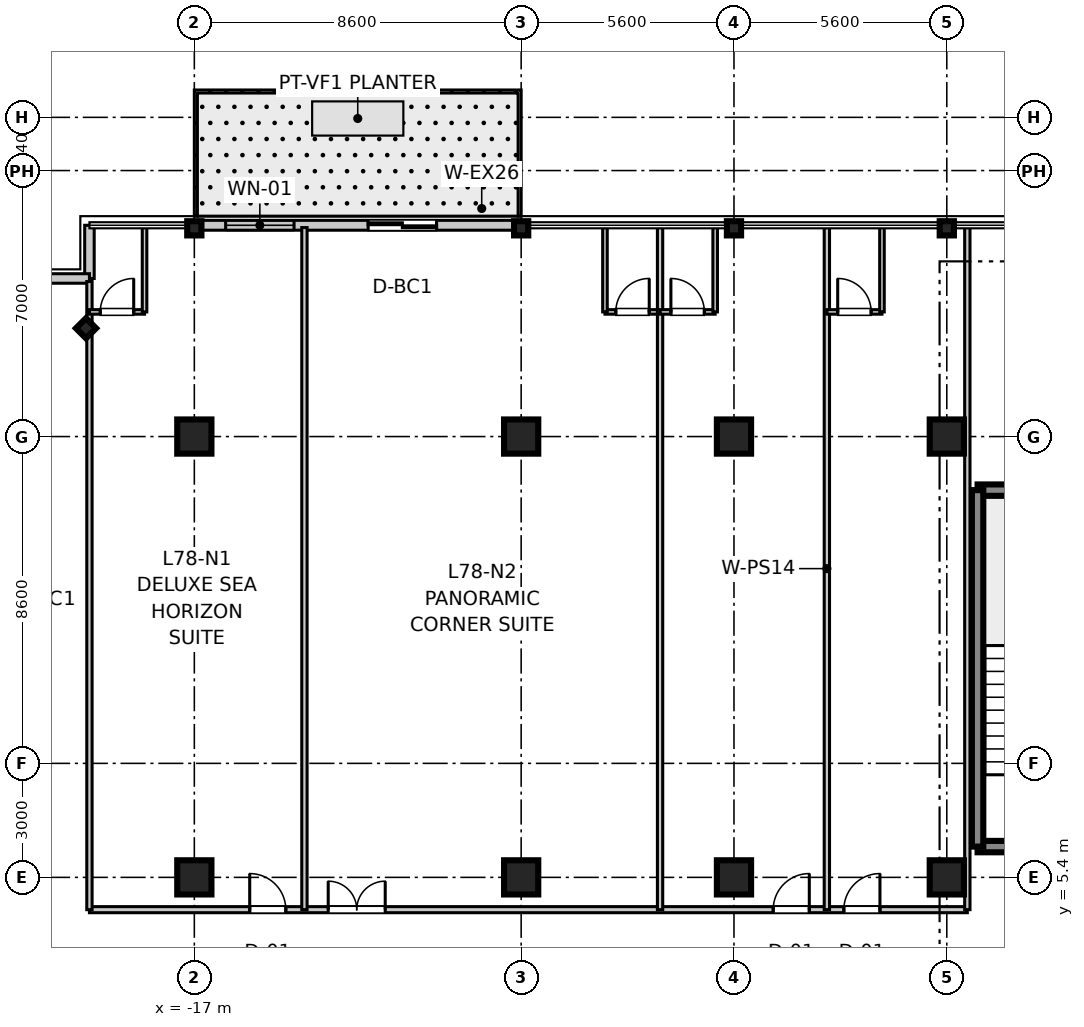
"""IFC4 building model, lengths in metres.
Left out: names, types, materials, properties, quantities, classifications, styles, units other than length and angle.
Written with IfcOpenShell. Run it as: python <this file> out.ifc"""

import sys

from ifc_helpers import new_model, si_unit, direction, frame, frame_2d, origin, origin_2d, place, context, subcontext, project, spatial, rectangle, i_section, extrude, source, transform, mapped, element, fill, save


model = new_model("IFC4")
c1 = context("Model", 3, precision=1e-05, world=origin(), true_north=direction((0.0, 1.0)))
c2 = subcontext(c1, "Body", "Model", "MODEL_VIEW")
j1 = project(units=[si_unit("LENGTHUNIT", "METRE"), si_unit("PLANEANGLEUNIT", "RADIAN")], contexts=[c1])
p1 = place(None, origin())
s1 = spatial("IfcSite", under=j1, at=p1, CompositionType="ELEMENT")
p2 = place(p1, origin())
s2 = spatial("IfcBuilding", under=s1, at=p2, CompositionType="ELEMENT")
p3 = place(p2, frame((0.0, 0.0, 304.2)))
s3 = spatial("IfcBuildingStorey", under=s2, at=p3, CompositionType="ELEMENT", Elevation=304.2)
m1 = source(origin(), c2, "Body", "SweptSolid", [
    extrude(rectangle(XDim=0.9, YDim=0.9, at=origin_2d()), origin(), (0.0, 0.0, 1.0), 3.805),
])
for number, where, z_axis, x_axis in (
    (1, (-17.0, 5.4, 0.0), (0.0, 0.0, 1.0), (1.0, 0.0, 0.0)),
    (2, (-17.0, 17.0, 0.0), (0.0, 0.0, 1.0), (1.0, 0.0, 0.0)),
    (3, (-8.4, 5.4, 0.0), (0.0, 0.0, 1.0), (1.0, 0.0, 0.0)),
    (4, (-8.4, 17.0, 0.0), (0.0, 0.0, 1.0), (1.0, 0.0, 0.0)),
    (5, (-2.8, 5.4, 0.0), (0.0, 0.0, 1.0), (1.0, 0.0, 0.0)),
    (6, (-2.8, 17.0, 0.0), (0.0, 0.0, 1.0), (1.0, 0.0, 0.0)),
    (7, (2.8, 5.4, 0.0), (0.0, 0.0, 1.0), (1.0, 0.0, 0.0)),
    (8, (2.8, 17.0, 0.0), (0.0, 0.0, 1.0), (1.0, 0.0, 0.0)),
):
    element("IfcColumn", number, at=place(p3, frame(where, z_axis=z_axis, x_axis=x_axis)), inside=s3, PredefinedType="COLUMN", context=c2, shape_type="MappedRepresentation", body=[
        mapped(m1, transform((0.0, 0.0, 0.0), scale=1.0)),
    ])
m2 = source(origin(), c2, "Body", "SweptSolid", [
    extrude(i_section(OverallWidth=0.374, OverallDepth=0.374, WebThickness=0.014, FlangeThickness=0.023, at=origin_2d()), origin(), (0.0, 0.0, 1.0), 3.805),
])
for number, where, z_axis, x_axis in (
    (9, (-17.0, 22.48, 0.0), (0.0, 0.0, 1.0), (0.0, 1.0, 0.0)),
    (10, (-8.4, 22.48, 0.0), (0.0, 0.0, 1.0), (0.0, 1.0, 0.0)),
    (11, (-2.8, 22.48, 0.0), (0.0, 0.0, 1.0), (0.0, 1.0, 0.0)),
    (12, (2.8, 22.48, 0.0), (0.0, 0.0, 1.0), (0.0, 1.0, 0.0)),
    (13, (-19.85, 19.85, 0.0), (0.0, 0.0, 1.0), (0.707, 0.707, 0.0)),
):
    element("IfcColumn", number, at=place(p3, frame(where, z_axis=z_axis, x_axis=x_axis)), inside=s3, PredefinedType="COLUMN", context=c2, shape_type="MappedRepresentation", body=[
        mapped(m2, transform((0.0, 0.0, 0.0), scale=1.0)),
    ])
m3 = source(origin(), c2, "Body", "SweptSolid", [
    extrude(rectangle(XDim=3.98, YDim=0.3, at=frame_2d((1.99, 0.0))), origin(), (0.0, 0.0, 1.0), 3.55),
])
for number, where, z_axis, x_axis in (
    (14, (3.61, 6.21, 0.0), (0.0, 0.0, 1.0), (1.0, 0.0, 0.0)),
    (15, (3.61, 15.59, 0.0), (0.0, 0.0, 1.0), (1.0, 0.0, 0.0)),
):
    element("IfcWall", number, at=place(p3, frame(where, z_axis=z_axis, x_axis=x_axis)), inside=s3, PredefinedType="SHEAR", context=c2, shape_type="MappedRepresentation", body=[
        mapped(m3, transform((0.0, 0.0, 0.0), scale=1.0)),
    ])
m4 = source(origin(), c2, "Body", "SweptSolid", [
    extrude(rectangle(XDim=9.38, YDim=0.3, at=frame_2d((4.69, 0.0))), origin(), (0.0, 0.0, 1.0), 3.55),
])
p4 = place(p3, frame((3.61, 6.21, 0.0), z_axis=(0.0, 0.0, 1.0), x_axis=(0.0, 1.0, 0.0)))
e16 = element("IfcWall", 16, at=p4, inside=s3, PredefinedType="SHEAR", context=c2, shape_type="MappedRepresentation", body=[
    mapped(m4, transform((0.0, 0.0, 0.0), scale=1.0)),
])
m5 = source(origin(), c2, "Body", "SweptSolid", [
    extrude(rectangle(XDim=1.4, YDim=0.25, at=frame_2d((0.7, 0.0))), origin(), (0.0, 0.0, 1.0), 3.55),
])
p5 = place(p3, frame((-19.76, 21.16, 0.0), z_axis=(0.0, 0.0, 1.0), x_axis=(0.0, 1.0, 0.0)))
e17 = element("IfcWall", 17, at=p5, inside=s3, PredefinedType="STANDARD", context=c2, shape_type="MappedRepresentation", body=[
    mapped(m5, transform((0.0, 0.0, 0.0), scale=1.0)),
])
m6 = source(origin(), c2, "Body", "SweptSolid", [
    extrude(rectangle(XDim=1.4, YDim=0.25, at=frame_2d((0.7, 0.0))), origin(), (0.0, 0.0, 1.0), 3.55),
])
p6 = place(p3, frame((-21.16, 21.16, 0.0), z_axis=(0.0, 0.0, 1.0), x_axis=(1.0, 0.0, 0.0)))
e18 = element("IfcWall", 18, at=p6, inside=s3, PredefinedType="STANDARD", context=c2, shape_type="MappedRepresentation", body=[
    mapped(m6, transform((0.0, 0.0, 0.0), scale=1.0)),
])
m7 = source(origin(), c2, "Body", "SweptSolid", [
    extrude(rectangle(XDim=8.6, YDim=0.26, at=frame_2d((4.3, 0.0))), origin(), (0.0, 0.0, 1.0), 3.03),
])
p7 = place(p3, frame((-17.0, 22.56, 0.0), z_axis=(0.0, 0.0, 1.0), x_axis=(1.0, 0.0, 0.0)))
e19 = element("IfcWall", 19, at=p7, inside=s3, PredefinedType="STANDARD", context=c2, shape_type="MappedRepresentation", body=[
    mapped(m7, transform((0.0, 0.0, 0.0), scale=1.0)),
])
p8 = place(p7, frame((4.574, 0.0, 0.0)))
e20 = element("IfcOpeningElement", 20, at=p8, cuts=e19, PredefinedType="OPENING", context=c2, shape_type="SweptSolid", body=[
    extrude(rectangle(XDim=1.8, YDim=2.25, at=frame_2d((0.9, 1.125))), frame((0.0, 0.14, 0.0), z_axis=(0.0, -1.0, 0.0), x_axis=(1.0, 0.0, 0.0)), (0.0, 0.0, 1.0), 0.28),
])
p9 = place(p7, frame((0.824, 0.0, 0.85)))
e21 = element("IfcOpeningElement", 21, at=p9, cuts=e19, PredefinedType="OPENING", context=c2, shape_type="SweptSolid", body=[
    extrude(rectangle(XDim=1.8, YDim=1.5, at=frame_2d((0.9, 0.75))), frame((0.0, 0.14, 0.0), z_axis=(0.0, -1.0, 0.0), x_axis=(1.0, 0.0, 0.0)), (0.0, 0.0, 1.0), 0.28),
])
m8 = source(origin(), c2, "Body", "SweptSolid", [
    extrude(rectangle(XDim=23.1, YDim=0.16, at=frame_2d((11.55, 0.0))), origin(), (0.0, 0.0, 1.0), 2.89),
])
p10 = place(p3, frame((-19.76, 4.55, 0.0), z_axis=(0.0, 0.0, 1.0), x_axis=(1.0, 0.0, 0.0)))
e22 = element("IfcWall", 22, at=p10, inside=s3, PredefinedType="PARTITIONING", context=c2, shape_type="MappedRepresentation", body=[
    mapped(m8, transform((0.0, 0.0, 0.0), scale=1.0)),
])
p11 = place(p10, frame((4.217, 0.0, 0.0)))
e23 = element("IfcOpeningElement", 23, at=p11, cuts=e22, PredefinedType="OPENING", context=c2, shape_type="SweptSolid", body=[
    extrude(rectangle(XDim=0.95, YDim=2.1, at=frame_2d((0.475, 1.05))), frame((0.0, 0.09, 0.0), z_axis=(0.0, -1.0, 0.0), x_axis=(1.0, 0.0, 0.0)), (0.0, 0.0, 1.0), 0.18),
])
p12 = place(p10, frame((6.283, 0.0, 0.0)))
e24 = element("IfcOpeningElement", 24, at=p12, cuts=e22, PredefinedType="OPENING", context=c2, shape_type="SweptSolid", body=[
    extrude(rectangle(XDim=1.5, YDim=2.15, at=frame_2d((0.75, 1.075))), frame((0.0, 0.09, 0.0), z_axis=(0.0, -1.0, 0.0), x_axis=(1.0, 0.0, 0.0)), (0.0, 0.0, 1.0), 0.18),
])
p13 = place(p10, frame((17.992, 0.0, 0.0)))
e25 = element("IfcOpeningElement", 25, at=p13, cuts=e22, PredefinedType="OPENING", context=c2, shape_type="SweptSolid", body=[
    extrude(rectangle(XDim=0.95, YDim=2.1, at=frame_2d((0.475, 1.05))), frame((0.0, 0.09, 0.0), z_axis=(0.0, -1.0, 0.0), x_axis=(1.0, 0.0, 0.0)), (0.0, 0.0, 1.0), 0.18),
])
p14 = place(p10, frame((19.851, 0.0, 0.0)))
e26 = element("IfcOpeningElement", 26, at=p14, cuts=e22, PredefinedType="OPENING", context=c2, shape_type="SweptSolid", body=[
    extrude(rectangle(XDim=0.95, YDim=2.1, at=frame_2d((0.475, 1.05))), frame((0.0, 0.09, 0.0), z_axis=(0.0, -1.0, 0.0), x_axis=(1.0, 0.0, 0.0)), (0.0, 0.0, 1.0), 0.18),
])
m9 = source(origin(), c2, "Body", "SweptSolid", [
    extrude(rectangle(XDim=16.53, YDim=0.14, at=frame_2d((8.265, 0.0))), origin(), (0.0, 0.0, 1.0), 2.89),
])
p15 = place(p3, frame((-19.76, 4.55, 0.0), z_axis=(0.0, 0.0, 1.0), x_axis=(0.0, 1.0, 0.0)))
e27 = element("IfcWall", 27, at=p15, inside=s3, PredefinedType="PARTITIONING", context=c2, shape_type="MappedRepresentation", body=[
    mapped(m9, transform((0.0, 0.0, 0.0), scale=1.0)),
])
m10 = source(origin(), c2, "Body", "SweptSolid", [
    extrude(rectangle(XDim=17.95, YDim=0.14, at=frame_2d((8.975, 0.0))), origin(), (0.0, 0.0, 1.0), 2.89),
])
p16 = place(p3, frame((3.34, 4.55, 0.0), z_axis=(0.0, 0.0, 1.0), x_axis=(0.0, 1.0, 0.0)))
e28 = element("IfcWall", 28, at=p16, inside=s3, PredefinedType="PARTITIONING", context=c2, shape_type="MappedRepresentation", body=[
    mapped(m10, transform((0.0, 0.0, 0.0), scale=1.0)),
])
m11 = source(origin(), c2, "Body", "SweptSolid", [
    extrude(rectangle(XDim=1.45, YDim=0.12, at=frame_2d((0.725, 0.0))), origin(), (0.0, 0.0, 1.0), 2.89),
])
p17 = place(p3, frame((-19.76, 20.28, 0.0), z_axis=(0.0, 0.0, 1.0), x_axis=(1.0, 0.0, 0.0)))
e29 = element("IfcWall", 29, at=p17, inside=s3, PredefinedType="PARTITIONING", context=c2, shape_type="MappedRepresentation", body=[
    mapped(m11, transform((0.0, 0.0, 0.0), scale=1.0)),
])
p18 = place(p17, frame((0.285, 0.0, 0.0)))
e30 = element("IfcOpeningElement", 30, at=p18, cuts=e29, PredefinedType="OPENING", context=c2, shape_type="SweptSolid", body=[
    extrude(rectangle(XDim=0.88, YDim=2.1, at=frame_2d((0.44, 1.05))), frame((0.0, 0.07, 0.0), z_axis=(0.0, -1.0, 0.0), x_axis=(1.0, 0.0, 0.0)), (0.0, 0.0, 1.0), 0.14),
])
m12 = source(origin(), c2, "Body", "SweptSolid", [
    extrude(rectangle(XDim=2.22, YDim=0.12, at=frame_2d((1.11, 0.0))), origin(), (0.0, 0.0, 1.0), 2.89),
])
p19 = place(p3, frame((-18.31, 20.28, 0.0), z_axis=(0.0, 0.0, 1.0), x_axis=(0.0, 1.0, 0.0)))
e31 = element("IfcWall", 31, at=p19, inside=s3, PredefinedType="PARTITIONING", context=c2, shape_type="MappedRepresentation", body=[
    mapped(m12, transform((0.0, 0.0, 0.0), scale=1.0)),
])
p20 = place(p3, frame((-14.103, 4.55, 0.0), z_axis=(0.0, 0.0, 1.0), x_axis=(0.0, 1.0, 0.0)))
e32 = element("IfcWall", 32, at=p20, inside=s3, PredefinedType="PARTITIONING", context=c2, shape_type="MappedRepresentation", body=[
    mapped(m10, transform((0.0, 0.0, 0.0), scale=1.0)),
])
p21 = place(p3, frame((-6.195, 20.28, 0.0), z_axis=(0.0, 0.0, 1.0), x_axis=(1.0, 0.0, 0.0)))
e33 = element("IfcWall", 33, at=p21, inside=s3, PredefinedType="PARTITIONING", context=c2, shape_type="MappedRepresentation", body=[
    mapped(m11, transform((0.0, 0.0, 0.0), scale=1.0)),
])
p22 = place(p21, frame((0.285, 0.0, 0.0)))
e34 = element("IfcOpeningElement", 34, at=p22, cuts=e33, PredefinedType="OPENING", context=c2, shape_type="SweptSolid", body=[
    extrude(rectangle(XDim=0.88, YDim=2.1, at=frame_2d((0.44, 1.05))), frame((0.0, 0.07, 0.0), z_axis=(0.0, -1.0, 0.0), x_axis=(1.0, 0.0, 0.0)), (0.0, 0.0, 1.0), 0.14),
])
p23 = place(p3, frame((-6.195, 20.28, 0.0), z_axis=(0.0, 0.0, 1.0), x_axis=(0.0, 1.0, 0.0)))
e35 = element("IfcWall", 35, at=p23, inside=s3, PredefinedType="PARTITIONING", context=c2, shape_type="MappedRepresentation", body=[
    mapped(m12, transform((0.0, 0.0, 0.0), scale=1.0)),
])
p24 = place(p3, frame((-4.745, 4.55, 0.0), z_axis=(0.0, 0.0, 1.0), x_axis=(0.0, 1.0, 0.0)))
e36 = element("IfcWall", 36, at=p24, inside=s3, PredefinedType="PARTITIONING", context=c2, shape_type="MappedRepresentation", body=[
    mapped(m10, transform((0.0, 0.0, 0.0), scale=1.0)),
])
m13 = source(origin(), c2, "Body", "SweptSolid", [
    extrude(rectangle(XDim=1.45, YDim=0.12, at=frame_2d((0.725, 0.0))), origin(), (0.0, 0.0, 1.0), 2.89),
])
p25 = place(p3, frame((-4.745, 20.28, 0.0), z_axis=(0.0, 0.0, 1.0), x_axis=(1.0, 0.0, 0.0)))
e37 = element("IfcWall", 37, at=p25, inside=s3, PredefinedType="PARTITIONING", context=c2, shape_type="MappedRepresentation", body=[
    mapped(m13, transform((0.0, 0.0, 0.0), scale=1.0)),
])
p26 = place(p25, frame((0.285, 0.0, 0.0)))
e38 = element("IfcOpeningElement", 38, at=p26, cuts=e37, PredefinedType="OPENING", context=c2, shape_type="SweptSolid", body=[
    extrude(rectangle(XDim=0.88, YDim=2.1, at=frame_2d((0.44, 1.05))), frame((0.0, 0.07, 0.0), z_axis=(0.0, -1.0, 0.0), x_axis=(1.0, 0.0, 0.0)), (0.0, 0.0, 1.0), 0.14),
])
p27 = place(p3, frame((-3.295, 20.28, 0.0), z_axis=(0.0, 0.0, 1.0), x_axis=(0.0, 1.0, 0.0)))
e39 = element("IfcWall", 39, at=p27, inside=s3, PredefinedType="PARTITIONING", context=c2, shape_type="MappedRepresentation", body=[
    mapped(m12, transform((0.0, 0.0, 0.0), scale=1.0)),
])
p28 = place(p3, frame((-0.356, 4.55, 0.0), z_axis=(0.0, 0.0, 1.0), x_axis=(0.0, 1.0, 0.0)))
e40 = element("IfcWall", 40, at=p28, inside=s3, PredefinedType="PARTITIONING", context=c2, shape_type="MappedRepresentation", body=[
    mapped(m10, transform((0.0, 0.0, 0.0), scale=1.0)),
])
p29 = place(p3, frame((-0.356, 20.28, 0.0), z_axis=(0.0, 0.0, 1.0), x_axis=(1.0, 0.0, 0.0)))
e41 = element("IfcWall", 41, at=p29, inside=s3, PredefinedType="PARTITIONING", context=c2, shape_type="MappedRepresentation", body=[
    mapped(m11, transform((0.0, 0.0, 0.0), scale=1.0)),
])
p30 = place(p29, frame((0.285, 0.0, 0.0)))
e42 = element("IfcOpeningElement", 42, at=p30, cuts=e41, PredefinedType="OPENING", context=c2, shape_type="SweptSolid", body=[
    extrude(rectangle(XDim=0.88, YDim=2.1, at=frame_2d((0.44, 1.05))), frame((0.0, 0.07, 0.0), z_axis=(0.0, -1.0, 0.0), x_axis=(1.0, 0.0, 0.0)), (0.0, 0.0, 1.0), 0.14),
])
p31 = place(p3, frame((1.094, 20.28, 0.0), z_axis=(0.0, 0.0, 1.0), x_axis=(0.0, 1.0, 0.0)))
e43 = element("IfcWall", 43, at=p31, inside=s3, PredefinedType="PARTITIONING", context=c2, shape_type="MappedRepresentation", body=[
    mapped(m12, transform((0.0, 0.0, 0.0), scale=1.0)),
])
m14 = source(origin(), c2, "Body", "SweptSolid", [
    extrude(rectangle(XDim=0.88, YDim=2.1, at=frame_2d((0.44, 1.05))), frame((0.0, 0.025, 0.0), z_axis=(0.0, -1.0, 0.0), x_axis=(1.0, 0.0, 0.0)), (0.0, 0.0, 1.0), 0.05),
])
p32 = place(p18, origin())
e44 = element("IfcDoor", 44, at=p32, inside=s3, OperationType="SINGLE_SWING_RIGHT", PredefinedType="DOOR", context=c2, shape_type="MappedRepresentation", body=[
    mapped(m14, transform((0.0, 0.0, 0.0), scale=1.0)),
])
fill(e30, e44)
m15 = source(origin(), c2, "Body", "SweptSolid", [
    extrude(rectangle(XDim=0.95, YDim=2.1, at=frame_2d((0.475, 1.05))), frame((0.0, 0.025, 0.0), z_axis=(0.0, -1.0, 0.0), x_axis=(1.0, 0.0, 0.0)), (0.0, 0.0, 1.0), 0.05),
])
p33 = place(p11, origin())
e45 = element("IfcDoor", 45, at=p33, inside=s3, OperationType="SINGLE_SWING_LEFT", PredefinedType="DOOR", context=c2, shape_type="MappedRepresentation", body=[
    mapped(m15, transform((0.0, 0.0, 0.0), scale=1.0)),
])
fill(e23, e45)
p34 = place(p22, origin())
e46 = element("IfcDoor", 46, at=p34, inside=s3, OperationType="SINGLE_SWING_RIGHT", PredefinedType="DOOR", context=c2, shape_type="MappedRepresentation", body=[
    mapped(m14, transform((0.0, 0.0, 0.0), scale=1.0)),
])
fill(e34, e46)
m16 = source(origin(), c2, "Body", "SweptSolid", [
    extrude(rectangle(XDim=1.5, YDim=2.15, at=frame_2d((0.75, 1.075))), frame((0.0, 0.025, 0.0), z_axis=(0.0, -1.0, 0.0), x_axis=(1.0, 0.0, 0.0)), (0.0, 0.0, 1.0), 0.05),
])
p35 = place(p12, origin())
e47 = element("IfcDoor", 47, at=p35, inside=s3, OperationType="DOUBLE_DOOR_SINGLE_SWING", PredefinedType="DOOR", context=c2, shape_type="MappedRepresentation", body=[
    mapped(m16, transform((0.0, 0.0, 0.0), scale=1.0)),
])
fill(e24, e47)
p36 = place(p26, origin())
e48 = element("IfcDoor", 48, at=p36, inside=s3, OperationType="SINGLE_SWING_LEFT", PredefinedType="DOOR", context=c2, shape_type="MappedRepresentation", body=[
    mapped(m14, transform((0.0, 0.0, 0.0), scale=1.0)),
])
fill(e38, e48)
p37 = place(p13, origin())
e49 = element("IfcDoor", 49, at=p37, inside=s3, OperationType="SINGLE_SWING_RIGHT", PredefinedType="DOOR", context=c2, shape_type="MappedRepresentation", body=[
    mapped(m15, transform((0.0, 0.0, 0.0), scale=1.0)),
])
fill(e25, e49)
p38 = place(p30, origin())
e50 = element("IfcDoor", 50, at=p38, inside=s3, OperationType="SINGLE_SWING_LEFT", PredefinedType="DOOR", context=c2, shape_type="MappedRepresentation", body=[
    mapped(m14, transform((0.0, 0.0, 0.0), scale=1.0)),
])
fill(e42, e50)
p39 = place(p14, origin())
e51 = element("IfcDoor", 51, at=p39, inside=s3, OperationType="SINGLE_SWING_RIGHT", PredefinedType="DOOR", context=c2, shape_type="MappedRepresentation", body=[
    mapped(m15, transform((0.0, 0.0, 0.0), scale=1.0)),
])
fill(e26, e51)
m17 = source(origin(), c2, "Body", "SweptSolid", [
    extrude(rectangle(XDim=1.8, YDim=2.25, at=frame_2d((0.9, 1.125))), frame((0.0, 0.025, 0.0), z_axis=(0.0, -1.0, 0.0), x_axis=(1.0, 0.0, 0.0)), (0.0, 0.0, 1.0), 0.05),
])
p40 = place(p8, origin())
e52 = element("IfcDoor", 52, at=p40, inside=s3, OperationType="DOUBLE_DOOR_SLIDING", PredefinedType="DOOR", context=c2, shape_type="MappedRepresentation", body=[
    mapped(m17, transform((0.0, 0.0, 0.0), scale=1.0)),
])
fill(e20, e52)
m18 = source(origin(), c2, "Body", "SweptSolid", [
    extrude(rectangle(XDim=1.8, YDim=1.5, at=frame_2d((0.9, 0.75))), frame((0.0, 0.03, 0.0), z_axis=(0.0, -1.0, 0.0), x_axis=(1.0, 0.0, 0.0)), (0.0, 0.0, 1.0), 0.06),
])
p41 = place(p9, origin())
e53 = element("IfcWindow", 53, at=p41, inside=s3, PartitioningType="SINGLE_PANEL", PredefinedType="WINDOW", context=c2, shape_type="MappedRepresentation", body=[
    mapped(m18, transform((0.0, 0.0, 0.0), scale=1.0)),
])
fill(e21, e53)
save(model, sys.argv[1])
